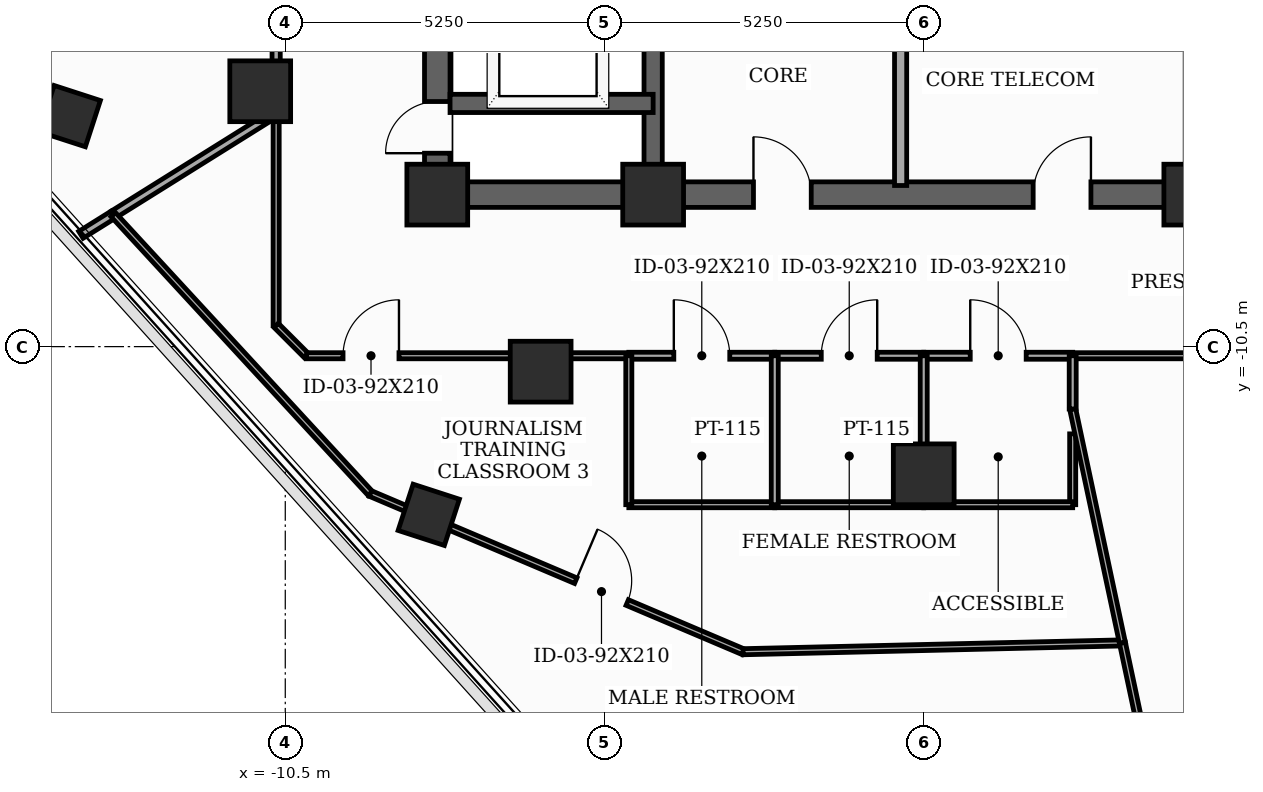
"""IFC4 building model, lengths in metres.
Left out: names, types, materials, properties, quantities, classifications, styles, units other than length and angle.
Written with IfcOpenShell. Run it as: python <this file> out.ifc"""

import sys

from ifc_helpers import new_model, si_unit, direction, frame, frame_2d, origin, origin_2d, place, context, subcontext, project, spatial, rectangle, extrude, element, fill, save


model = new_model("IFC4")
c1 = context("Model", 3, precision=1e-05, world=origin(), true_north=direction((0.0, 1.0)))
c2 = subcontext(c1, "Body", "Model", "MODEL_VIEW")
j1 = project(units=[si_unit("LENGTHUNIT", "METRE"), si_unit("PLANEANGLEUNIT", "RADIAN")], contexts=[c1])
p1 = place(None, origin())
s1 = spatial("IfcSite", under=j1, at=p1, CompositionType="ELEMENT")
p2 = place(p1, origin())
s2 = spatial("IfcBuilding", under=s1, at=p2, CompositionType="ELEMENT")
p3 = place(p2, frame((0.0, 0.0, 290.6)))
s3 = spatial("IfcBuildingStorey", under=s2, at=p3, CompositionType="ELEMENT", Elevation=290.6)
for number, where, z_axis, x_axis in (
    (1, (-8.0, -8.0, 0.0), (0.0, 0.0, 1.0), (1.0, 0.0, 0.0)),
    (2, (-4.45, -8.0, 0.0), (0.0, 0.0, 1.0), (1.0, 0.0, 0.0)),
    (3, (4.45, -8.0, 0.0), (0.0, 0.0, 1.0), (1.0, 0.0, 0.0)),
    (4, (-10.912, -6.3, 0.0), (0.0, 0.0, 1.0), (1.0, 0.0, 0.0)),
    (5, (-6.3, -10.912, 0.0), (0.0, 0.0, 1.0), (1.0, 0.0, 0.0)),
    (6, (0.0, -12.6, 0.0), (0.0, 0.0, 1.0), (1.0, 0.0, 0.0)),
):
    element("IfcColumn", number, at=place(p3, frame(where, z_axis=z_axis, x_axis=x_axis)), inside=s3, PredefinedType="COLUMN", context=c2, shape_type="SweptSolid", body=[
        extrude(rectangle(XDim=1.0, YDim=1.0, at=origin_2d()), origin(), (0.0, 0.0, 1.0), 3.7),
    ])
for number, where, z_axis, x_axis in (
    (7, (-14.045, -6.709, 0.0), (0.0, 0.0, 1.0), (0.309, 0.951, 0.0)),
    (8, (-8.14, -13.266, 0.0), (0.0, 0.0, 1.0), (0.309, 0.951, 0.0)),
):
    element("IfcColumn", number, at=place(p3, frame(where, z_axis=z_axis, x_axis=x_axis)), inside=s3, PredefinedType="COLUMN", context=c2, shape_type="SweptSolid", body=[
        extrude(rectangle(XDim=0.8, YDim=0.8, at=origin_2d()), origin(), (0.0, 0.0, 1.0), 3.7),
    ])
p4 = place(p3, frame((-8.0, -8.0, 0.0), z_axis=(0.0, 0.0, 1.0), x_axis=(0.0, 1.0, 0.0)))
e9 = element("IfcWall", 9, at=p4, inside=s3, PredefinedType="SHEAR", context=c2, shape_type="SweptSolid", body=[
    extrude(rectangle(XDim=16.0, YDim=0.42, at=frame_2d((8.0, 0.0))), origin(), (0.0, 0.0, 1.0), 3.5),
])
p5 = place(p4, frame((0.681, 0.0, 0.0)))
e10 = element("IfcOpeningElement", 10, at=p5, cuts=e9, PredefinedType="OPENING", context=c2, shape_type="SweptSolid", body=[
    extrude(rectangle(XDim=0.85, YDim=2.02, at=frame_2d((0.425, 1.01))), frame((0.0, 0.22, 0.0), z_axis=(0.0, -1.0, 0.0), x_axis=(1.0, 0.0, 0.0)), (0.0, 0.0, 1.0), 0.44),
])
p6 = place(p4, frame((5.35, 0.0, 0.0)))
e11 = element("IfcOpeningElement", 11, at=p6, cuts=e9, PredefinedType="OPENING", context=c2, shape_type="SweptSolid", body=[
    extrude(rectangle(XDim=1.05, YDim=2.15, at=frame_2d((0.525, 1.075))), frame((0.0, 0.22, 0.0), z_axis=(0.0, -1.0, 0.0), x_axis=(1.0, 0.0, 0.0)), (0.0, 0.0, 1.0), 0.44),
])
p7 = place(p3, frame((-8.0, -8.0, 0.0), z_axis=(0.0, 0.0, 1.0), x_axis=(1.0, 0.0, 0.0)))
e12 = element("IfcWall", 12, at=p7, inside=s3, PredefinedType="SHEAR", context=c2, shape_type="SweptSolid", body=[
    extrude(rectangle(XDim=16.0, YDim=0.42, at=frame_2d((8.0, 0.0))), origin(), (0.0, 0.0, 1.0), 3.5),
])
p8 = place(p7, frame((5.2, 0.0, 0.0)))
e13 = element("IfcOpeningElement", 13, at=p8, cuts=e12, PredefinedType="OPENING", context=c2, shape_type="SweptSolid", body=[
    extrude(rectangle(XDim=0.95, YDim=2.1, at=frame_2d((0.475, 1.05))), frame((0.0, 0.22, 0.0), z_axis=(0.0, -1.0, 0.0), x_axis=(1.0, 0.0, 0.0)), (0.0, 0.0, 1.0), 0.44),
])
p9 = place(p7, frame((9.8, 0.0, 0.0)))
e14 = element("IfcOpeningElement", 14, at=p9, cuts=e12, PredefinedType="OPENING", context=c2, shape_type="SweptSolid", body=[
    extrude(rectangle(XDim=0.95, YDim=2.1, at=frame_2d((0.475, 1.05))), frame((0.0, 0.22, 0.0), z_axis=(0.0, -1.0, 0.0), x_axis=(1.0, 0.0, 0.0)), (0.0, 0.0, 1.0), 0.44),
])
p10 = place(p3, frame((-4.45, -7.79, 0.0), z_axis=(0.0, 0.0, 1.0), x_axis=(0.0, 1.0, 0.0)))
e15 = element("IfcWall", 15, at=p10, inside=s3, PredefinedType="SHEAR", context=c2, shape_type="SweptSolid", body=[
    extrude(rectangle(XDim=15.58, YDim=0.3, at=frame_2d((7.79, 0.0))), origin(), (0.0, 0.0, 1.0), 3.5),
])
p11 = place(p3, frame((-7.79, -6.5, 0.0), z_axis=(0.0, 0.0, 1.0), x_axis=(1.0, 0.0, 0.0)))
e16 = element("IfcWall", 16, at=p11, inside=s3, PredefinedType="SHEAR", context=c2, shape_type="SweptSolid", body=[
    extrude(rectangle(XDim=3.34, YDim=0.3, at=frame_2d((1.67, 0.0))), origin(), (0.0, 0.0, 1.0), 3.5),
])
p12 = place(p3, frame((-0.38, -7.85, 0.0), z_axis=(0.0, 0.0, 1.0), x_axis=(0.0, 1.0, 0.0)))
e17 = element("IfcWall", 17, at=p12, inside=s3, PredefinedType="SOLIDWALL", context=c2, shape_type="SweptSolid", body=[
    extrude(rectangle(XDim=2.95, YDim=0.2, at=frame_2d((1.475, 0.0))), origin(), (0.0, 0.0, 1.0), 2.885),
])
p13 = place(p3, frame((-10.65, -4.225, 0.0), z_axis=(0.0, 0.0, 1.0), x_axis=(0.0, -1.0, 0.0)))
e18 = element("IfcWall", 18, at=p13, inside=s3, PredefinedType="PARTITIONING", context=c2, shape_type="SweptSolid", body=[
    extrude(rectangle(XDim=2.43, YDim=0.135, at=frame_2d((1.215, 0.0))), origin(), (0.0, 0.0, 1.0), 2.885),
])
p14 = place(p3, frame((-10.65, -6.655, 0.0), z_axis=(0.0, 0.0, 1.0), x_axis=(0.0, -1.0, 0.0)))
e19 = element("IfcWall", 19, at=p14, inside=s3, PredefinedType="MOVABLE", context=c2, shape_type="SweptSolid", body=[
    extrude(rectangle(XDim=3.495, YDim=0.1, at=frame_2d((1.748, 0.0))), origin(), (0.0, 0.0, 1.0), 2.885),
])
p15 = place(p3, frame((-10.65, -10.15, 0.0), z_axis=(0.0, 0.0, 1.0), x_axis=(0.707106781187, -0.707106781187, 0.0)))
e20 = element("IfcWall", 20, at=p15, inside=s3, PredefinedType="MOVABLE", context=c2, shape_type="SweptSolid", body=[
    extrude(rectangle(XDim=0.707, YDim=0.1, at=frame_2d((0.354, 0.0))), origin(), (0.0, 0.0, 1.0), 3.035),
])
p16 = place(p3, frame((-10.15, -10.65, 0.0), z_axis=(0.0, 0.0, 1.0), x_axis=(1.0, 0.0, 0.0)))
e21 = element("IfcWall", 21, at=p16, inside=s3, PredefinedType="MOVABLE", context=c2, shape_type="SweptSolid", body=[
    extrude(rectangle(XDim=5.3, YDim=0.1, at=frame_2d((2.65, 0.0))), origin(), (0.0, 0.0, 1.0), 2.885),
])
p17 = place(p16, frame((0.6, 0.0, 0.0)))
e22 = element("IfcOpeningElement", 22, at=p17, cuts=e21, PredefinedType="OPENING", context=c2, shape_type="SweptSolid", body=[
    extrude(rectangle(XDim=0.92, YDim=2.1, at=frame_2d((0.46, 1.05))), frame((0.0, 0.06, 0.0), z_axis=(0.0, -1.0, 0.0), x_axis=(1.0, 0.0, 0.0)), (0.0, 0.0, 1.0), 0.12),
])
p18 = place(p3, frame((-4.85, -10.65, 0.0), z_axis=(0.0, 0.0, 1.0), x_axis=(1.0, 0.0, 0.0)))
e23 = element("IfcWall", 23, at=p18, inside=s3, PredefinedType="PARTITIONING", context=c2, shape_type="SweptSolid", body=[
    extrude(rectangle(XDim=2.4, YDim=0.115, at=frame_2d((1.2, 0.0))), origin(), (0.0, 0.0, 1.0), 3.5),
])
p19 = place(p18, frame((0.74, 0.0, 0.0)))
e24 = element("IfcOpeningElement", 24, at=p19, cuts=e23, PredefinedType="OPENING", context=c2, shape_type="SweptSolid", body=[
    extrude(rectangle(XDim=0.92, YDim=2.1, at=frame_2d((0.46, 1.05))), frame((0.0, 0.067, 0.0), z_axis=(0.0, -1.0, 0.0), x_axis=(1.0, 0.0, 0.0)), (0.0, 0.0, 1.0), 0.135),
])
p20 = place(p3, frame((-2.45, -10.65, 0.0), z_axis=(0.0, 0.0, 1.0), x_axis=(1.0, 0.0, 0.0)))
e25 = element("IfcWall", 25, at=p20, inside=s3, PredefinedType="PARTITIONING", context=c2, shape_type="SweptSolid", body=[
    extrude(rectangle(XDim=2.45, YDim=0.115, at=frame_2d((1.225, 0.0))), origin(), (0.0, 0.0, 1.0), 2.885),
])
p21 = place(p20, frame((0.765, 0.0, 0.0)))
e26 = element("IfcOpeningElement", 26, at=p21, cuts=e25, PredefinedType="OPENING", context=c2, shape_type="SweptSolid", body=[
    extrude(rectangle(XDim=0.92, YDim=2.1, at=frame_2d((0.46, 1.05))), frame((0.0, 0.067, 0.0), z_axis=(0.0, -1.0, 0.0), x_axis=(1.0, 0.0, 0.0)), (0.0, 0.0, 1.0), 0.135),
])
p22 = place(p3, frame((0.0, -10.65, 0.0), z_axis=(0.0, 0.0, 1.0), x_axis=(1.0, 0.0, 0.0)))
e27 = element("IfcWall", 27, at=p22, inside=s3, PredefinedType="PARTITIONING", context=c2, shape_type="SweptSolid", body=[
    extrude(rectangle(XDim=2.45, YDim=0.115, at=frame_2d((1.225, 0.0))), origin(), (0.0, 0.0, 1.0), 3.5),
])
p23 = place(p22, frame((0.765, 0.0, 0.0)))
e28 = element("IfcOpeningElement", 28, at=p23, cuts=e27, PredefinedType="OPENING", context=c2, shape_type="SweptSolid", body=[
    extrude(rectangle(XDim=0.92, YDim=2.1, at=frame_2d((0.46, 1.05))), frame((0.0, 0.067, 0.0), z_axis=(0.0, -1.0, 0.0), x_axis=(1.0, 0.0, 0.0)), (0.0, 0.0, 1.0), 0.135),
])
p24 = place(p3, frame((2.45, -10.65, 0.0), z_axis=(0.0, 0.0, 1.0), x_axis=(1.0, 0.0, 0.0)))
e29 = element("IfcWall", 29, at=p24, inside=s3, PredefinedType="MOVABLE", context=c2, shape_type="SweptSolid", body=[
    extrude(rectangle(XDim=7.139, YDim=0.1, at=frame_2d((3.57, 0.0))), origin(), (0.0, 0.0, 1.0), 2.885),
])
p25 = place(p3, frame((-13.329, -8.329, 0.0), z_axis=(0.0, 0.0, 1.0), x_axis=(0.848059079617, 0.529901686617, 0.0)))
e30 = element("IfcWall", 30, at=p25, inside=s3, PredefinedType="PARTITIONING", context=c2, shape_type="SweptSolid", body=[
    extrude(rectangle(XDim=3.159, YDim=0.135, at=frame_2d((1.58, 0.0))), origin(), (0.0, 0.0, 1.0), 2.885),
])
p26 = place(p3, frame((-13.861, -8.661, 0.0), z_axis=(0.0, 0.0, 1.0), x_axis=(0.848151340075, 0.529754003599, 0.0)))
e31 = element("IfcWall", 31, at=p26, inside=s3, PredefinedType="PARTITIONING", context=c2, shape_type="SweptSolid", body=[
    extrude(rectangle(XDim=0.627, YDim=0.135, at=frame_2d((0.313, 0.0))), origin(), (0.0, 0.0, 1.0), 3.5),
])
p27 = place(p3, frame((-2.45, -13.1, 0.0), z_axis=(0.0, 0.0, 1.0), x_axis=(-1.0, 0.0, 0.0)))
e32 = element("IfcWall", 32, at=p27, inside=s3, PredefinedType="MOVABLE", context=c2, shape_type="SweptSolid", body=[
    extrude(rectangle(XDim=2.4, YDim=0.1, at=frame_2d((1.2, 0.0))), origin(), (0.0, 0.0, 1.0), 3.5),
])
p28 = place(p3, frame((-4.85, -13.1, 0.0), z_axis=(0.0, 0.0, 1.0), x_axis=(0.0, 1.0, 0.0)))
e33 = element("IfcWall", 33, at=p28, inside=s3, PredefinedType="MOVABLE", context=c2, shape_type="SweptSolid", body=[
    extrude(rectangle(XDim=2.45, YDim=0.1, at=frame_2d((1.225, 0.0))), origin(), (0.0, 0.0, 1.0), 2.885),
])
p29 = place(p3, frame((0.0, -13.1, 0.0), z_axis=(0.0, 0.0, 1.0), x_axis=(-1.0, 0.0, 0.0)))
e34 = element("IfcWall", 34, at=p29, inside=s3, PredefinedType="MOVABLE", context=c2, shape_type="SweptSolid", body=[
    extrude(rectangle(XDim=2.45, YDim=0.1, at=frame_2d((1.225, 0.0))), origin(), (0.0, 0.0, 1.0), 3.035),
])
p30 = place(p3, frame((-13.329, -8.329, 0.0), z_axis=(0.0, 0.0, 1.0), x_axis=(0.677841155448, -0.735208384052, 0.0)))
e35 = element("IfcWall", 35, at=p30, inside=s3, PredefinedType="MOVABLE", context=c2, shape_type="SweptSolid", body=[
    extrude(rectangle(XDim=6.239, YDim=0.1, at=frame_2d((3.12, 0.0))), origin(), (0.0, 0.0, 1.0), 3.5),
])
p31 = place(p3, frame((-9.1, -12.916, 0.0), z_axis=(0.0, 0.0, 1.0), x_axis=(0.920506675175, -0.390726836752, 0.0)))
e36 = element("IfcWall", 36, at=p31, inside=s3, PredefinedType="MOVABLE", context=c2, shape_type="SweptSolid", body=[
    extrude(rectangle(XDim=6.659, YDim=0.1, at=frame_2d((3.33, 0.0))), origin(), (0.0, 0.0, 1.0), 3.035),
])
p32 = place(p31, frame((3.669, 0.0, 0.0)))
e37 = element("IfcOpeningElement", 37, at=p32, cuts=e36, PredefinedType="OPENING", context=c2, shape_type="SweptSolid", body=[
    extrude(rectangle(XDim=0.92, YDim=2.1, at=frame_2d((0.46, 1.05))), frame((0.0, 0.06, 0.0), z_axis=(0.0, -1.0, 0.0), x_axis=(1.0, 0.0, 0.0)), (0.0, 0.0, 1.0), 0.12),
])
p33 = place(p3, frame((-2.97, -15.518, 0.0), z_axis=(0.0, 0.0, 1.0), x_axis=(0.99972988351, 0.023241342836, 0.0)))
e38 = element("IfcWall", 38, at=p33, inside=s3, PredefinedType="MOVABLE", context=c2, shape_type="SweptSolid", body=[
    extrude(rectangle(XDim=6.24, YDim=0.1, at=frame_2d((3.12, 0.0))), origin(), (0.0, 0.0, 1.0), 3.035),
])
p34 = place(p3, frame((2.45, -11.935, 0.0), z_axis=(0.0, 0.0, 1.0), x_axis=(0.0, -1.0, 0.0)))
e39 = element("IfcWall", 39, at=p34, inside=s3, PredefinedType="MOVABLE", context=c2, shape_type="SweptSolid", body=[
    extrude(rectangle(XDim=1.166, YDim=0.1, at=frame_2d((0.583, 0.0))), origin(), (0.0, 0.0, 1.0), 2.885),
])
p35 = place(p3, frame((2.45, -13.1, 0.0), z_axis=(0.0, 0.0, 1.0), x_axis=(-1.0, 0.0, 0.0)))
e40 = element("IfcWall", 40, at=p35, inside=s3, PredefinedType="MOVABLE", context=c2, shape_type="SweptSolid", body=[
    extrude(rectangle(XDim=2.45, YDim=0.1, at=frame_2d((1.225, 0.0))), origin(), (0.0, 0.0, 1.0), 3.035),
])
p36 = place(p3, frame((3.268, -15.373, 0.0), z_axis=(0.0, 0.0, 1.0), x_axis=(-0.208002774368, 0.978128235895, 0.0)))
e41 = element("IfcWall", 41, at=p36, inside=s3, PredefinedType="MOVABLE", context=c2, shape_type="SweptSolid", body=[
    extrude(rectangle(XDim=3.933, YDim=0.1, at=frame_2d((1.967, 0.0))), origin(), (0.0, 0.0, 1.0), 2.885),
])
for number, where, z_axis, x_axis in (
    (42, (-2.45, -13.1, 0.0), (0.0, 0.0, 1.0), (0.0, 1.0, 0.0)),
    (43, (0.0, -13.1, 0.0), (0.0, 0.0, 1.0), (0.0, 1.0, 0.0)),
):
    element("IfcWall", number, at=place(p3, frame(where, z_axis=z_axis, x_axis=x_axis)), inside=s3, PredefinedType="PARTITIONING", context=c2, shape_type="SweptSolid", body=[
        extrude(rectangle(XDim=2.45, YDim=0.115, at=frame_2d((1.225, 0.0))), origin(), (0.0, 0.0, 1.0), 2.885),
    ])
p37 = place(p3, frame((5.994, -28.2, 0.0), z_axis=(0.0, 0.0, 1.0), x_axis=(-0.20785296635, 0.978160081162, 0.0)))
e44 = element("IfcWall", 44, at=p37, inside=s3, PredefinedType="MOVABLE", context=c2, shape_type="SweptSolid", body=[
    extrude(rectangle(XDim=13.113, YDim=0.1, at=frame_2d((6.557, 0.0))), origin(), (0.0, 0.0, 1.0), 3.035),
])
p38 = place(p3, frame((2.45, -11.526, 0.0), z_axis=(0.0, 0.0, 1.0), x_axis=(0.0, 1.0, 0.0)))
e45 = element("IfcWall", 45, at=p38, inside=s3, PredefinedType="PARTITIONING", context=c2, shape_type="SweptSolid", body=[
    extrude(rectangle(XDim=0.876, YDim=0.115, at=frame_2d((0.438, 0.0))), origin(), (0.0, 0.0, 1.0), 3.5),
])
p39 = place(p5, origin())
e46 = element("IfcDoor", 46, at=p39, inside=s3, OperationType="SINGLE_SWING_LEFT", PredefinedType="TRAPDOOR", context=c2, shape_type="SweptSolid", body=[
    extrude(rectangle(XDim=0.85, YDim=2.02, at=frame_2d((0.425, 1.01))), frame((0.0, 0.025, 0.0), z_axis=(0.0, -1.0, 0.0), x_axis=(1.0, 0.0, 0.0)), (0.0, 0.0, 1.0), 0.05),
])
fill(e10, e46)
p40 = place(p8, origin())
e47 = element("IfcDoor", 47, at=p40, inside=s3, OperationType="SINGLE_SWING_LEFT", PredefinedType="DOOR", context=c2, shape_type="SweptSolid", body=[
    extrude(rectangle(XDim=0.95, YDim=2.1, at=frame_2d((0.475, 1.05))), frame((0.0, 0.025, 0.0), z_axis=(0.0, -1.0, 0.0), x_axis=(1.0, 0.0, 0.0)), (0.0, 0.0, 1.0), 0.05),
])
fill(e13, e47)
p41 = place(p9, origin())
e48 = element("IfcDoor", 48, at=p41, inside=s3, OperationType="SINGLE_SWING_RIGHT", PredefinedType="DOOR", context=c2, shape_type="SweptSolid", body=[
    extrude(rectangle(XDim=0.95, YDim=2.1, at=frame_2d((0.475, 1.05))), frame((0.0, 0.025, 0.0), z_axis=(0.0, -1.0, 0.0), x_axis=(1.0, 0.0, 0.0)), (0.0, 0.0, 1.0), 0.05),
])
fill(e14, e48)
p42 = place(p17, origin())
e49 = element("IfcDoor", 49, at=p42, inside=s3, OperationType="SINGLE_SWING_RIGHT", PredefinedType="DOOR", context=c2, shape_type="SweptSolid", body=[
    extrude(rectangle(XDim=0.92, YDim=2.1, at=frame_2d((0.46, 1.05))), frame((0.0, 0.025, 0.0), z_axis=(0.0, -1.0, 0.0), x_axis=(1.0, 0.0, 0.0)), (0.0, 0.0, 1.0), 0.05),
])
fill(e22, e49)
p43 = place(p19, origin())
e50 = element("IfcDoor", 50, at=p43, inside=s3, OperationType="SINGLE_SWING_LEFT", PredefinedType="DOOR", context=c2, shape_type="SweptSolid", body=[
    extrude(rectangle(XDim=0.92, YDim=2.1, at=frame_2d((0.46, 1.05))), frame((0.0, 0.025, 0.0), z_axis=(0.0, -1.0, 0.0), x_axis=(1.0, 0.0, 0.0)), (0.0, 0.0, 1.0), 0.05),
])
fill(e24, e50)
p44 = place(p21, origin())
e51 = element("IfcDoor", 51, at=p44, inside=s3, OperationType="SINGLE_SWING_RIGHT", PredefinedType="DOOR", context=c2, shape_type="SweptSolid", body=[
    extrude(rectangle(XDim=0.92, YDim=2.1, at=frame_2d((0.46, 1.05))), frame((0.0, 0.025, 0.0), z_axis=(0.0, -1.0, 0.0), x_axis=(1.0, 0.0, 0.0)), (0.0, 0.0, 1.0), 0.05),
])
fill(e26, e51)
p45 = place(p23, origin())
e52 = element("IfcDoor", 52, at=p45, inside=s3, OperationType="SINGLE_SWING_LEFT", PredefinedType="DOOR", context=c2, shape_type="SweptSolid", body=[
    extrude(rectangle(XDim=0.92, YDim=2.1, at=frame_2d((0.46, 1.05))), frame((0.0, 0.025, 0.0), z_axis=(0.0, -1.0, 0.0), x_axis=(1.0, 0.0, 0.0)), (0.0, 0.0, 1.0), 0.05),
])
fill(e28, e52)
p46 = place(p32, origin())
e53 = element("IfcDoor", 53, at=p46, inside=s3, OperationType="SINGLE_SWING_LEFT", PredefinedType="DOOR", context=c2, shape_type="SweptSolid", body=[
    extrude(rectangle(XDim=0.92, YDim=2.1, at=frame_2d((0.46, 1.05))), frame((0.0, 0.025, 0.0), z_axis=(0.0, -1.0, 0.0), x_axis=(1.0, 0.0, 0.0)), (0.0, 0.0, 1.0), 0.05),
])
fill(e37, e53)
save(model, sys.argv[1])
